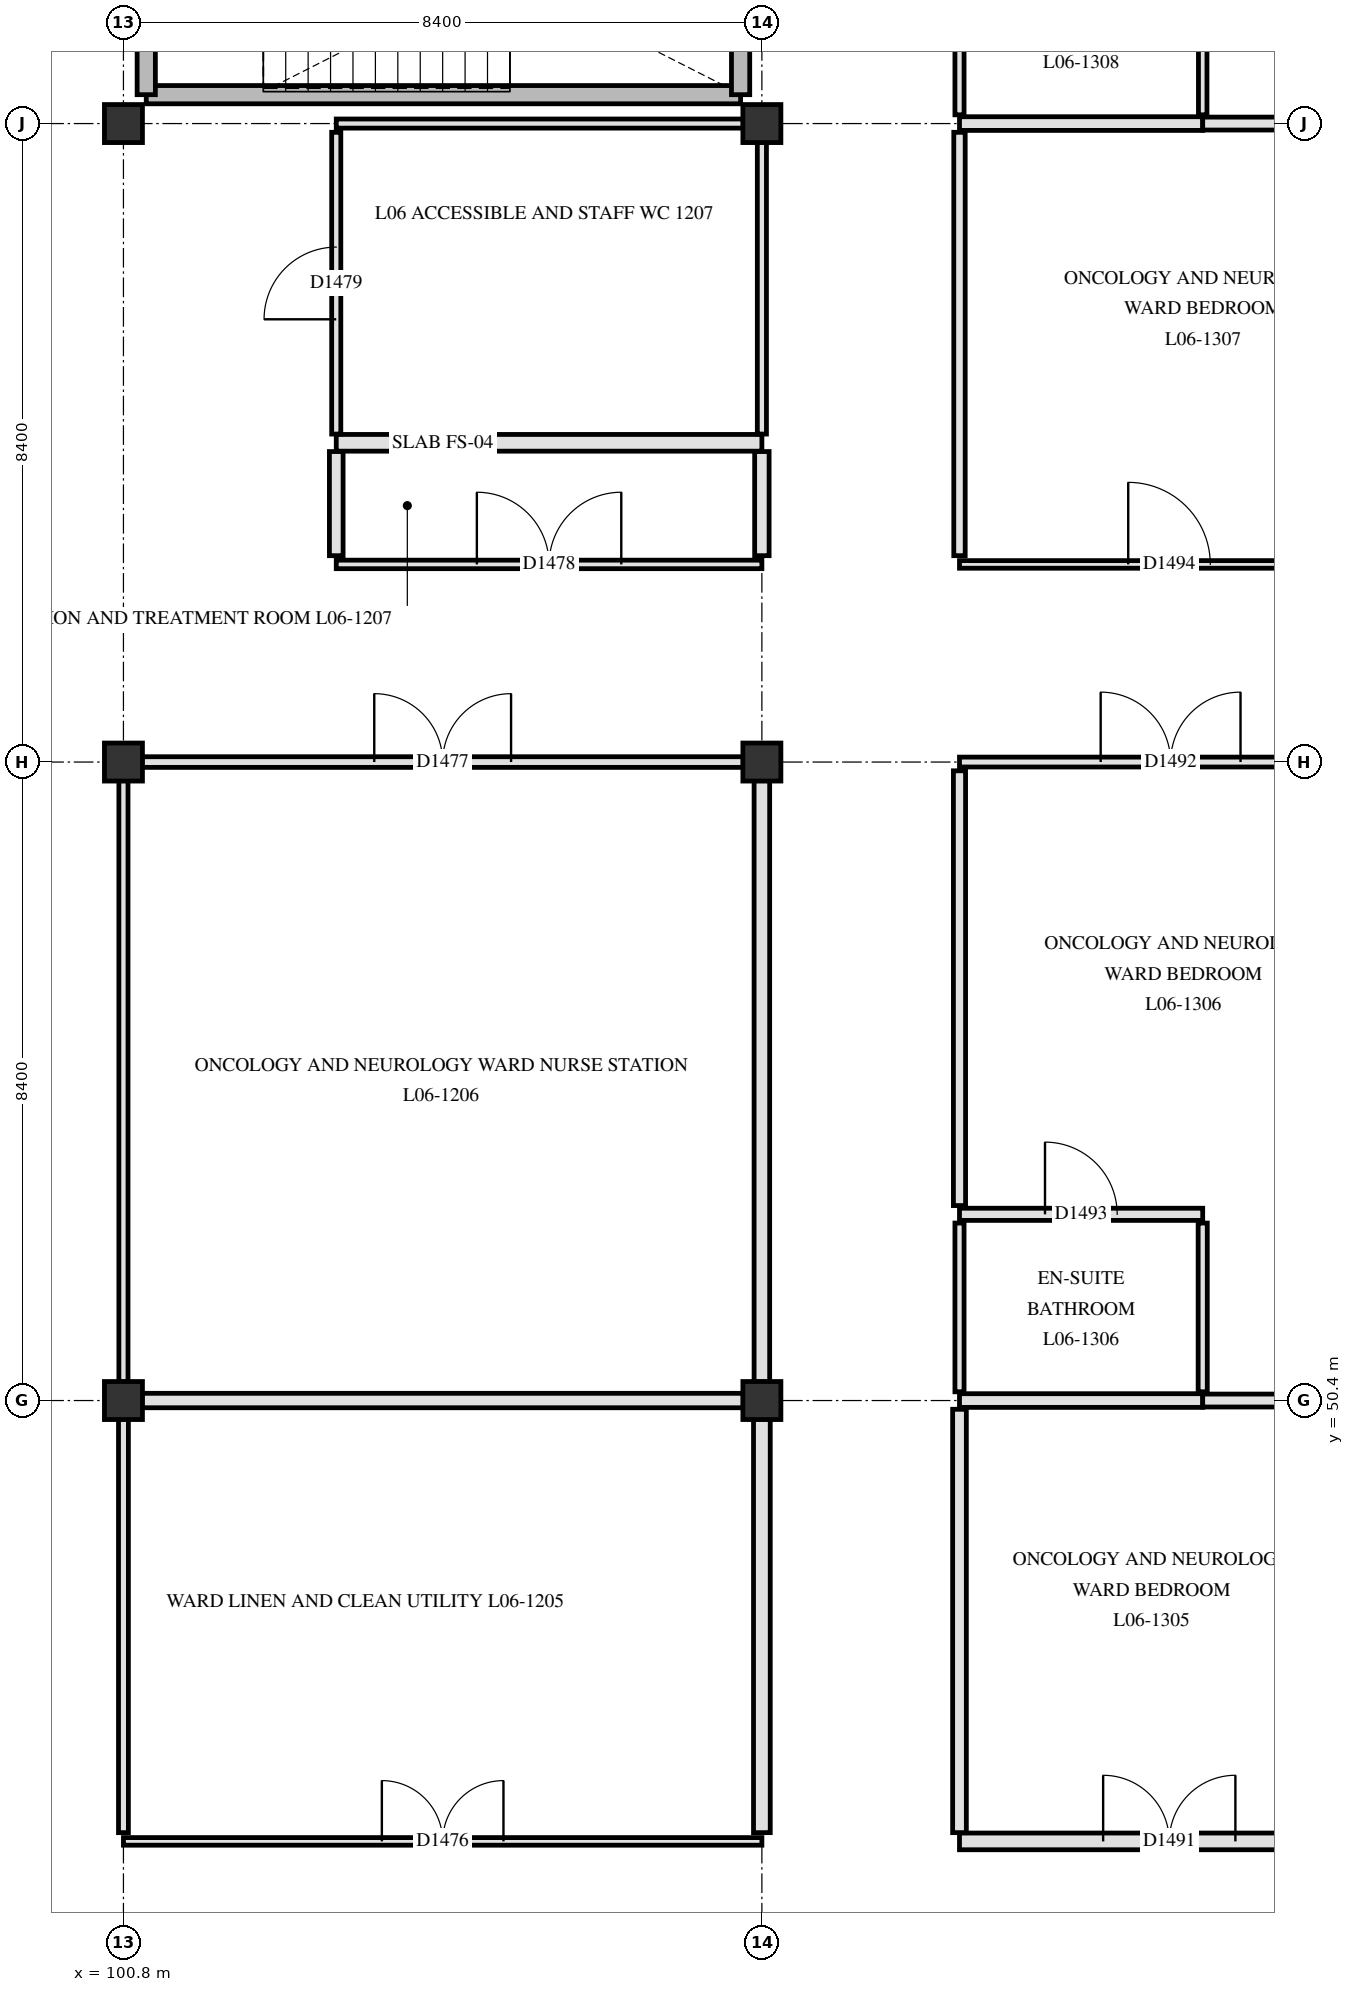
"""IFC4 building model, lengths in metres.
Left out: names, types, materials, properties, quantities, classifications, styles, units other than length and angle.
Written with IfcOpenShell. Run it as: python <this file> out.ifc"""

import sys

from ifc_helpers import new_model, si_unit, direction, frame, frame_2d, origin, origin_2d, place, context, subcontext, project, spatial, rectangle, extrude, element, fill, save


model = new_model("IFC4")
c1 = context("Model", 3, precision=1e-05, world=origin(), true_north=direction((0.0, 1.0)))
c2 = subcontext(c1, "Body", "Model", "MODEL_VIEW")
j1 = project(units=[si_unit("LENGTHUNIT", "METRE"), si_unit("PLANEANGLEUNIT", "RADIAN")], contexts=[c1])
p1 = place(None, origin())
s1 = spatial("IfcSite", under=j1, at=p1, CompositionType="ELEMENT")
p2 = place(p1, origin())
s2 = spatial("IfcBuilding", under=s1, at=p2, CompositionType="ELEMENT")
p3 = place(p2, frame((0.0, 0.0, 26.4)))
s3 = spatial("IfcBuildingStorey", under=s2, at=p3, CompositionType="ELEMENT", Elevation=26.4)
for number, where, z_axis, x_axis in (
    (1, (100.8, 50.4, 0.0), (0.0, 0.0, 1.0), (1.0, 0.0, 0.0)),
    (2, (100.8, 58.8, 0.0), (0.0, 0.0, 1.0), (1.0, 0.0, 0.0)),
    (3, (100.8, 67.2, 0.0), (0.0, 0.0, 1.0), (1.0, 0.0, 0.0)),
    (4, (109.2, 50.4, 0.0), (0.0, 0.0, 1.0), (1.0, 0.0, 0.0)),
    (5, (109.2, 58.8, 0.0), (0.0, 0.0, 1.0), (1.0, 0.0, 0.0)),
    (6, (109.2, 67.2, 0.0), (0.0, 0.0, 1.0), (1.0, 0.0, 0.0)),
):
    element("IfcColumn", number, at=place(p3, frame(where, z_axis=z_axis, x_axis=x_axis)), inside=s3, PredefinedType="COLUMN", context=c2, shape_type="SweptSolid", body=[
        extrude(rectangle(XDim=0.5, YDim=0.5, at=origin_2d()), origin(), (0.0, 0.0, 1.0), 3.9),
    ])
p4 = place(p3, frame((101.1, 67.58, 0.0), z_axis=(0.0, 0.0, 1.0), x_axis=(1.0, 0.0, 0.0)))
e7 = element("IfcWall", 7, at=p4, inside=s3, PredefinedType="SHEAR", context=c2, shape_type="SweptSolid", body=[
    extrude(rectangle(XDim=7.82, YDim=0.24, at=frame_2d((3.91, 0.0))), origin(), (0.0, 0.0, 1.0), 3.62),
])
for number, where, z_axis, x_axis in (
    (8, (101.1, 67.58, 0.0), (0.0, 0.0, 1.0), (0.0, 1.0, 0.0)),
    (9, (108.92, 67.58, 0.0), (0.0, 0.0, 1.0), (0.0, 1.0, 0.0)),
):
    element("IfcWall", number, at=place(p3, frame(where, z_axis=z_axis, x_axis=x_axis)), inside=s3, PredefinedType="SHEAR", context=c2, shape_type="SweptSolid", body=[
        extrude(rectangle(XDim=3.32, YDim=0.24, at=frame_2d((1.66, 0.0))), origin(), (0.0, 0.0, 1.0), 3.62),
    ])
p5 = place(p3, frame((100.8, 44.6, 0.0), z_axis=(0.0, 0.0, 1.0), x_axis=(1.0, 0.0, 0.0)))
e10 = element("IfcWall", 10, at=p5, inside=s3, PredefinedType="PARTITIONING", context=c2, shape_type="SweptSolid", body=[
    extrude(rectangle(XDim=8.4, YDim=0.1, at=frame_2d((4.2, 0.0))), origin(), (0.0, 0.0, 1.0), 3.21),
])
p6 = place(p5, frame((3.4, 0.0, 0.0)))
e11 = element("IfcOpeningElement", 11, at=p6, cuts=e10, PredefinedType="OPENING", context=c2, shape_type="SweptSolid", body=[
    extrude(rectangle(XDim=1.6, YDim=2.25, at=frame_2d((0.8, 1.125))), frame((0.0, 0.06, 0.0), z_axis=(0.0, -1.0, 0.0), x_axis=(1.0, 0.0, 0.0)), (0.0, 0.0, 1.0), 0.12),
])
p7 = place(p3, frame((111.8, 44.6, 0.0), z_axis=(0.0, 0.0, 1.0), x_axis=(1.0, 0.0, 0.0)))
e12 = element("IfcWall", 12, at=p7, inside=s3, PredefinedType="PARTITIONING", context=c2, shape_type="SweptSolid", body=[
    extrude(rectangle(XDim=5.52, YDim=0.22, at=frame_2d((2.76, 0.0))), origin(), (0.0, 0.0, 1.0), 3.34),
])
p8 = place(p7, frame((1.89, 0.0, 0.0)))
e13 = element("IfcOpeningElement", 13, at=p8, cuts=e12, PredefinedType="OPENING", context=c2, shape_type="SweptSolid", body=[
    extrude(rectangle(XDim=1.74, YDim=2.24, at=frame_2d((0.87, 1.12))), frame((0.0, 0.12, 0.0), z_axis=(0.0, -1.0, 0.0), x_axis=(1.0, 0.0, 0.0)), (0.0, 0.0, 1.0), 0.24),
])
p9 = place(p3, frame((101.045, 50.4, 0.0), z_axis=(0.0, 0.0, 1.0), x_axis=(1.0, 0.0, 0.0)))
e14 = element("IfcWall", 14, at=p9, inside=s3, PredefinedType="PARTITIONING", context=c2, shape_type="SweptSolid", body=[
    extrude(rectangle(XDim=7.91, YDim=0.19, at=frame_2d((3.955, 0.0))), origin(), (0.0, 0.0, 1.0), 3.21),
])
p10 = place(p3, frame((111.8, 50.4, 0.0), z_axis=(0.0, 0.0, 1.0), x_axis=(1.0, 0.0, 0.0)))
e15 = element("IfcWall", 15, at=p10, inside=s3, PredefinedType="PARTITIONING", context=c2, shape_type="SweptSolid", body=[
    extrude(rectangle(XDim=3.2, YDim=0.18, at=frame_2d((1.6, 0.0))), origin(), (0.0, 0.0, 1.0), 3.21),
])
p11 = place(p3, frame((115.0, 50.4, 0.0), z_axis=(0.0, 0.0, 1.0), x_axis=(1.0, 0.0, 0.0)))
e16 = element("IfcWall", 16, at=p11, inside=s3, PredefinedType="PARTITIONING", context=c2, shape_type="SweptSolid", body=[
    extrude(rectangle(XDim=2.355, YDim=0.17, at=frame_2d((1.177, 0.0))), origin(), (0.0, 0.0, 1.0), 3.21),
])
p12 = place(p3, frame((111.8, 52.85, 0.0), z_axis=(0.0, 0.0, 1.0), x_axis=(1.0, 0.0, 0.0)))
e17 = element("IfcWall", 17, at=p12, inside=s3, PredefinedType="PARTITIONING", context=c2, shape_type="SweptSolid", body=[
    extrude(rectangle(XDim=3.2, YDim=0.16, at=frame_2d((1.6, 0.0))), origin(), (0.0, 0.0, 1.0), 3.61),
])
p13 = place(p12, frame((1.125, 0.0, 0.0)))
e18 = element("IfcOpeningElement", 18, at=p13, cuts=e17, PredefinedType="OPENING", context=c2, shape_type="SweptSolid", body=[
    extrude(rectangle(XDim=0.95, YDim=2.1, at=frame_2d((0.475, 1.05))), frame((0.0, 0.09, 0.0), z_axis=(0.0, -1.0, 0.0), x_axis=(1.0, 0.0, 0.0)), (0.0, 0.0, 1.0), 0.18),
])
p14 = place(p3, frame((101.045, 58.8, 0.0), z_axis=(0.0, 0.0, 1.0), x_axis=(1.0, 0.0, 0.0)))
e19 = element("IfcWall", 19, at=p14, inside=s3, PredefinedType="PARTITIONING", context=c2, shape_type="SweptSolid", body=[
    extrude(rectangle(XDim=7.91, YDim=0.14, at=frame_2d((3.955, 0.0))), origin(), (0.0, 0.0, 1.0), 3.21),
])
p15 = place(p14, frame((3.055, 0.0, 0.0)))
e20 = element("IfcOpeningElement", 20, at=p15, cuts=e19, PredefinedType="OPENING", context=c2, shape_type="SweptSolid", body=[
    extrude(rectangle(XDim=1.8, YDim=2.25, at=frame_2d((0.9, 1.125))), frame((0.0, 0.08, 0.0), z_axis=(0.0, -1.0, 0.0), x_axis=(1.0, 0.0, 0.0)), (0.0, 0.0, 1.0), 0.16),
])
p16 = place(p3, frame((111.8, 58.8, 0.0), z_axis=(0.0, 0.0, 1.0), x_axis=(1.0, 0.0, 0.0)))
e21 = element("IfcWall", 21, at=p16, inside=s3, PredefinedType="PARTITIONING", context=c2, shape_type="SweptSolid", body=[
    extrude(rectangle(XDim=5.555, YDim=0.13, at=frame_2d((2.777, 0.0))), origin(), (0.0, 0.0, 1.0), 3.21),
])
p17 = place(p16, frame((1.857, 0.0, 0.0)))
e22 = element("IfcOpeningElement", 22, at=p17, cuts=e21, PredefinedType="OPENING", context=c2, shape_type="SweptSolid", body=[
    extrude(rectangle(XDim=1.84, YDim=2.28, at=frame_2d((0.92, 1.14))), frame((0.0, 0.075, 0.0), z_axis=(0.0, -1.0, 0.0), x_axis=(1.0, 0.0, 0.0)), (0.0, 0.0, 1.0), 0.15),
])
p18 = place(p3, frame((103.6, 61.4, 0.0), z_axis=(0.0, 0.0, 1.0), x_axis=(1.0, 0.0, 0.0)))
e23 = element("IfcWall", 23, at=p18, inside=s3, PredefinedType="PARTITIONING", context=c2, shape_type="SweptSolid", body=[
    extrude(rectangle(XDim=5.6, YDim=0.112, at=frame_2d((2.8, 0.0))), origin(), (0.0, 0.0, 1.0), 3.21),
])
p19 = place(p18, frame((1.85, 0.0, 0.0)))
e24 = element("IfcOpeningElement", 24, at=p19, cuts=e23, PredefinedType="OPENING", context=c2, shape_type="SweptSolid", body=[
    extrude(rectangle(XDim=1.9, YDim=2.3, at=frame_2d((0.95, 1.15))), frame((0.0, 0.066, 0.0), z_axis=(0.0, -1.0, 0.0), x_axis=(1.0, 0.0, 0.0)), (0.0, 0.0, 1.0), 0.132),
])
p20 = place(p3, frame((111.8, 61.4, 0.0), z_axis=(0.0, 0.0, 1.0), x_axis=(1.0, 0.0, 0.0)))
e25 = element("IfcWall", 25, at=p20, inside=s3, PredefinedType="PARTITIONING", context=c2, shape_type="SweptSolid", body=[
    extrude(rectangle(XDim=5.52, YDim=0.1, at=frame_2d((2.76, 0.0))), origin(), (0.0, 0.0, 1.0), 3.61),
])
p21 = place(p20, frame((2.22, 0.0, 0.0)))
e26 = element("IfcOpeningElement", 26, at=p21, cuts=e25, PredefinedType="OPENING", context=c2, shape_type="SweptSolid", body=[
    extrude(rectangle(XDim=1.08, YDim=2.12, at=frame_2d((0.54, 1.06))), frame((0.0, 0.06, 0.0), z_axis=(0.0, -1.0, 0.0), x_axis=(1.0, 0.0, 0.0)), (0.0, 0.0, 1.0), 0.12),
])
p22 = place(p3, frame((103.6, 63.0, 0.0), z_axis=(0.0, 0.0, 1.0), x_axis=(1.0, 0.0, 0.0)))
e27 = element("IfcWall", 27, at=p22, inside=s3, PredefinedType="PARTITIONING", context=c2, shape_type="SweptSolid", body=[
    extrude(rectangle(XDim=5.6, YDim=0.22, at=frame_2d((2.8, 0.0))), origin(), (0.0, 0.0, 1.0), 3.21),
])
p23 = place(p3, frame((103.6, 67.2, 0.0), z_axis=(0.0, 0.0, 1.0), x_axis=(1.0, 0.0, 0.0)))
e28 = element("IfcWall", 28, at=p23, inside=s3, PredefinedType="PARTITIONING", context=c2, shape_type="SweptSolid", body=[
    extrude(rectangle(XDim=5.355, YDim=0.12, at=frame_2d((2.677, 0.0))), origin(), (0.0, 0.0, 1.0), 3.21),
])
p24 = place(p3, frame((111.8, 67.2, 0.0), z_axis=(0.0, 0.0, 1.0), x_axis=(1.0, 0.0, 0.0)))
e29 = element("IfcWall", 29, at=p24, inside=s3, PredefinedType="PARTITIONING", context=c2, shape_type="SweptSolid", body=[
    extrude(rectangle(XDim=3.2, YDim=0.18, at=frame_2d((1.6, 0.0))), origin(), (0.0, 0.0, 1.0), 3.61),
])
p25 = place(p3, frame((115.0, 67.2, 0.0), z_axis=(0.0, 0.0, 1.0), x_axis=(1.0, 0.0, 0.0)))
e30 = element("IfcWall", 30, at=p25, inside=s3, PredefinedType="PARTITIONING", context=c2, shape_type="SweptSolid", body=[
    extrude(rectangle(XDim=2.32, YDim=0.17, at=frame_2d((1.16, 0.0))), origin(), (0.0, 0.0, 1.0), 3.61),
])
p26 = place(p3, frame((100.8, 44.715, 0.0), z_axis=(0.0, 0.0, 1.0), x_axis=(0.0, 1.0, 0.0)))
e31 = element("IfcWall", 31, at=p26, inside=s3, PredefinedType="PARTITIONING", context=c2, shape_type="SweptSolid", body=[
    extrude(rectangle(XDim=5.44, YDim=0.13, at=frame_2d((2.72, 0.0))), origin(), (0.0, 0.0, 1.0), 3.21),
])
p27 = place(p3, frame((100.8, 50.645, 0.0), z_axis=(0.0, 0.0, 1.0), x_axis=(0.0, 1.0, 0.0)))
e32 = element("IfcWall", 32, at=p27, inside=s3, PredefinedType="PARTITIONING", context=c2, shape_type="SweptSolid", body=[
    extrude(rectangle(XDim=7.91, YDim=0.12, at=frame_2d((3.955, 0.0))), origin(), (0.0, 0.0, 1.0), 3.21),
])
p28 = place(p3, frame((103.6, 61.515, 0.0), z_axis=(0.0, 0.0, 1.0), x_axis=(0.0, 1.0, 0.0)))
e33 = element("IfcWall", 33, at=p28, inside=s3, PredefinedType="PARTITIONING", context=c2, shape_type="SweptSolid", body=[
    extrude(rectangle(XDim=1.37, YDim=0.18, at=frame_2d((0.685, 0.0))), origin(), (0.0, 0.0, 1.0), 3.34),
])
p29 = place(p3, frame((103.6, 63.115, 0.0), z_axis=(0.0, 0.0, 1.0), x_axis=(0.0, 1.0, 0.0)))
e34 = element("IfcWall", 34, at=p29, inside=s3, PredefinedType="PARTITIONING", context=c2, shape_type="SweptSolid", body=[
    extrude(rectangle(XDim=3.97, YDim=0.12, at=frame_2d((1.985, 0.0))), origin(), (0.0, 0.0, 1.0), 3.34),
])
p30 = place(p29, frame((1.51, 0.0, 0.0)))
e35 = element("IfcOpeningElement", 35, at=p30, cuts=e34, PredefinedType="OPENING", context=c2, shape_type="SweptSolid", body=[
    extrude(rectangle(XDim=0.95, YDim=2.1, at=frame_2d((0.475, 1.05))), frame((0.0, 0.07, 0.0), z_axis=(0.0, -1.0, 0.0), x_axis=(1.0, 0.0, 0.0)), (0.0, 0.0, 1.0), 0.14),
])
p31 = place(p3, frame((109.2, 44.715, 0.0), z_axis=(0.0, 0.0, 1.0), x_axis=(0.0, 1.0, 0.0)))
e36 = element("IfcWall", 36, at=p31, inside=s3, PredefinedType="PARTITIONING", context=c2, shape_type="SweptSolid", body=[
    extrude(rectangle(XDim=5.44, YDim=0.22, at=frame_2d((2.72, 0.0))), origin(), (0.0, 0.0, 1.0), 3.21),
])
p32 = place(p3, frame((109.2, 50.645, 0.0), z_axis=(0.0, 0.0, 1.0), x_axis=(0.0, 1.0, 0.0)))
e37 = element("IfcWall", 37, at=p32, inside=s3, PredefinedType="PARTITIONING", context=c2, shape_type="SweptSolid", body=[
    extrude(rectangle(XDim=7.91, YDim=0.205, at=frame_2d((3.955, 0.0))), origin(), (0.0, 0.0, 1.0), 3.21),
])
p33 = place(p3, frame((109.2, 61.515, 0.0), z_axis=(0.0, 0.0, 1.0), x_axis=(0.0, 1.0, 0.0)))
e38 = element("IfcWall", 38, at=p33, inside=s3, PredefinedType="PARTITIONING", context=c2, shape_type="SweptSolid", body=[
    extrude(rectangle(XDim=1.37, YDim=0.19, at=frame_2d((0.685, 0.0))), origin(), (0.0, 0.0, 1.0), 3.21),
])
p34 = place(p3, frame((109.2, 63.115, 0.0), z_axis=(0.0, 0.0, 1.0), x_axis=(0.0, 1.0, 0.0)))
e39 = element("IfcWall", 39, at=p34, inside=s3, PredefinedType="PARTITIONING", context=c2, shape_type="SweptSolid", body=[
    extrude(rectangle(XDim=3.84, YDim=0.12, at=frame_2d((1.92, 0.0))), origin(), (0.0, 0.0, 1.0), 3.21),
])
p35 = place(p3, frame((111.8, 44.715, 0.0), z_axis=(0.0, 0.0, 1.0), x_axis=(0.0, 1.0, 0.0)))
e40 = element("IfcWall", 40, at=p35, inside=s3, PredefinedType="PARTITIONING", context=c2, shape_type="SweptSolid", body=[
    extrude(rectangle(XDim=5.57, YDim=0.18, at=frame_2d((2.785, 0.0))), origin(), (0.0, 0.0, 1.0), 3.34),
])
p36 = place(p3, frame((111.8, 50.515, 0.0), z_axis=(0.0, 0.0, 1.0), x_axis=(0.0, 1.0, 0.0)))
e41 = element("IfcWall", 41, at=p36, inside=s3, PredefinedType="PARTITIONING", context=c2, shape_type="SweptSolid", body=[
    extrude(rectangle(XDim=2.22, YDim=0.12, at=frame_2d((1.11, 0.0))), origin(), (0.0, 0.0, 1.0), 3.61),
])
p37 = place(p3, frame((111.8, 52.965, 0.0), z_axis=(0.0, 0.0, 1.0), x_axis=(0.0, 1.0, 0.0)))
e42 = element("IfcWall", 42, at=p37, inside=s3, PredefinedType="PARTITIONING", context=c2, shape_type="SweptSolid", body=[
    extrude(rectangle(XDim=5.72, YDim=0.16, at=frame_2d((2.86, 0.0))), origin(), (0.0, 0.0, 1.0), 3.34),
])
p38 = place(p3, frame((111.8, 61.515, 0.0), z_axis=(0.0, 0.0, 1.0), x_axis=(0.0, 1.0, 0.0)))
e43 = element("IfcWall", 43, at=p38, inside=s3, PredefinedType="PARTITIONING", context=c2, shape_type="SweptSolid", body=[
    extrude(rectangle(XDim=5.57, YDim=0.15, at=frame_2d((2.785, 0.0))), origin(), (0.0, 0.0, 1.0), 3.34),
])
p39 = place(p3, frame((111.8, 67.315, 0.0), z_axis=(0.0, 0.0, 1.0), x_axis=(0.0, 1.0, 0.0)))
e44 = element("IfcWall", 44, at=p39, inside=s3, PredefinedType="PARTITIONING", context=c2, shape_type="SweptSolid", body=[
    extrude(rectangle(XDim=2.22, YDim=0.12, at=frame_2d((1.11, 0.0))), origin(), (0.0, 0.0, 1.0), 3.61),
])
p40 = place(p3, frame((115.0, 50.515, 0.0), z_axis=(0.0, 0.0, 1.0), x_axis=(0.0, 1.0, 0.0)))
e45 = element("IfcWall", 45, at=p40, inside=s3, PredefinedType="PARTITIONING", context=c2, shape_type="SweptSolid", body=[
    extrude(rectangle(XDim=2.22, YDim=0.12, at=frame_2d((1.11, 0.0))), origin(), (0.0, 0.0, 1.0), 3.61),
])
p41 = place(p3, frame((115.0, 67.315, 0.0), z_axis=(0.0, 0.0, 1.0), x_axis=(0.0, 1.0, 0.0)))
e46 = element("IfcWall", 46, at=p41, inside=s3, PredefinedType="PARTITIONING", context=c2, shape_type="SweptSolid", body=[
    extrude(rectangle(XDim=2.22, YDim=0.112, at=frame_2d((1.11, 0.0))), origin(), (0.0, 0.0, 1.0), 3.61),
])
p42 = place(p6, origin())
e47 = element("IfcDoor", 47, at=p42, inside=s3, OperationType="DOUBLE_SWING_LEFT", PredefinedType="DOOR", context=c2, shape_type="SweptSolid", body=[
    extrude(rectangle(XDim=1.6, YDim=2.25, at=frame_2d((0.8, 1.125))), frame((0.0, 0.025, 0.0), z_axis=(0.0, -1.0, 0.0), x_axis=(1.0, 0.0, 0.0)), (0.0, 0.0, 1.0), 0.05),
])
fill(e11, e47)
p43 = place(p15, origin())
e48 = element("IfcDoor", 48, at=p43, inside=s3, OperationType="DOUBLE_SWING_RIGHT", PredefinedType="DOOR", context=c2, shape_type="SweptSolid", body=[
    extrude(rectangle(XDim=1.8, YDim=2.25, at=frame_2d((0.9, 1.125))), frame((0.0, 0.025, 0.0), z_axis=(0.0, -1.0, 0.0), x_axis=(1.0, 0.0, 0.0)), (0.0, 0.0, 1.0), 0.05),
])
fill(e20, e48)
p44 = place(p19, origin())
e49 = element("IfcDoor", 49, at=p44, inside=s3, OperationType="DOUBLE_SWING_LEFT", PredefinedType="DOOR", context=c2, shape_type="SweptSolid", body=[
    extrude(rectangle(XDim=1.9, YDim=2.3, at=frame_2d((0.95, 1.15))), frame((0.0, 0.025, 0.0), z_axis=(0.0, -1.0, 0.0), x_axis=(1.0, 0.0, 0.0)), (0.0, 0.0, 1.0), 0.05),
])
fill(e24, e49)
p45 = place(p30, origin())
e50 = element("IfcDoor", 50, at=p45, inside=s3, OperationType="SINGLE_SWING_LEFT", PredefinedType="DOOR", context=c2, shape_type="SweptSolid", body=[
    extrude(rectangle(XDim=0.95, YDim=2.1, at=frame_2d((0.475, 1.05))), frame((0.0, 0.025, 0.0), z_axis=(0.0, -1.0, 0.0), x_axis=(1.0, 0.0, 0.0)), (0.0, 0.0, 1.0), 0.05),
])
fill(e35, e50)
p46 = place(p8, origin())
e51 = element("IfcDoor", 51, at=p46, inside=s3, OperationType="DOUBLE_SWING_RIGHT", PredefinedType="DOOR", context=c2, shape_type="SweptSolid", body=[
    extrude(rectangle(XDim=1.74, YDim=2.24, at=frame_2d((0.87, 1.12))), frame((0.0, 0.025, 0.0), z_axis=(0.0, -1.0, 0.0), x_axis=(1.0, 0.0, 0.0)), (0.0, 0.0, 1.0), 0.05),
])
fill(e13, e51)
p47 = place(p17, origin())
e52 = element("IfcDoor", 52, at=p47, inside=s3, OperationType="DOUBLE_SWING_LEFT", PredefinedType="DOOR", context=c2, shape_type="SweptSolid", body=[
    extrude(rectangle(XDim=1.84, YDim=2.28, at=frame_2d((0.92, 1.14))), frame((0.0, 0.025, 0.0), z_axis=(0.0, -1.0, 0.0), x_axis=(1.0, 0.0, 0.0)), (0.0, 0.0, 1.0), 0.05),
])
fill(e22, e52)
p48 = place(p13, origin())
e53 = element("IfcDoor", 53, at=p48, inside=s3, OperationType="SINGLE_SWING_LEFT", PredefinedType="DOOR", context=c2, shape_type="SweptSolid", body=[
    extrude(rectangle(XDim=0.95, YDim=2.1, at=frame_2d((0.475, 1.05))), frame((0.0, 0.025, 0.0), z_axis=(0.0, -1.0, 0.0), x_axis=(1.0, 0.0, 0.0)), (0.0, 0.0, 1.0), 0.05),
])
fill(e18, e53)
p49 = place(p21, origin())
e54 = element("IfcDoor", 54, at=p49, inside=s3, OperationType="SINGLE_SWING_LEFT", PredefinedType="DOOR", context=c2, shape_type="SweptSolid", body=[
    extrude(rectangle(XDim=1.08, YDim=2.12, at=frame_2d((0.54, 1.06))), frame((0.0, 0.025, 0.0), z_axis=(0.0, -1.0, 0.0), x_axis=(1.0, 0.0, 0.0)), (0.0, 0.0, 1.0), 0.05),
])
fill(e26, e54)
save(model, sys.argv[1])
